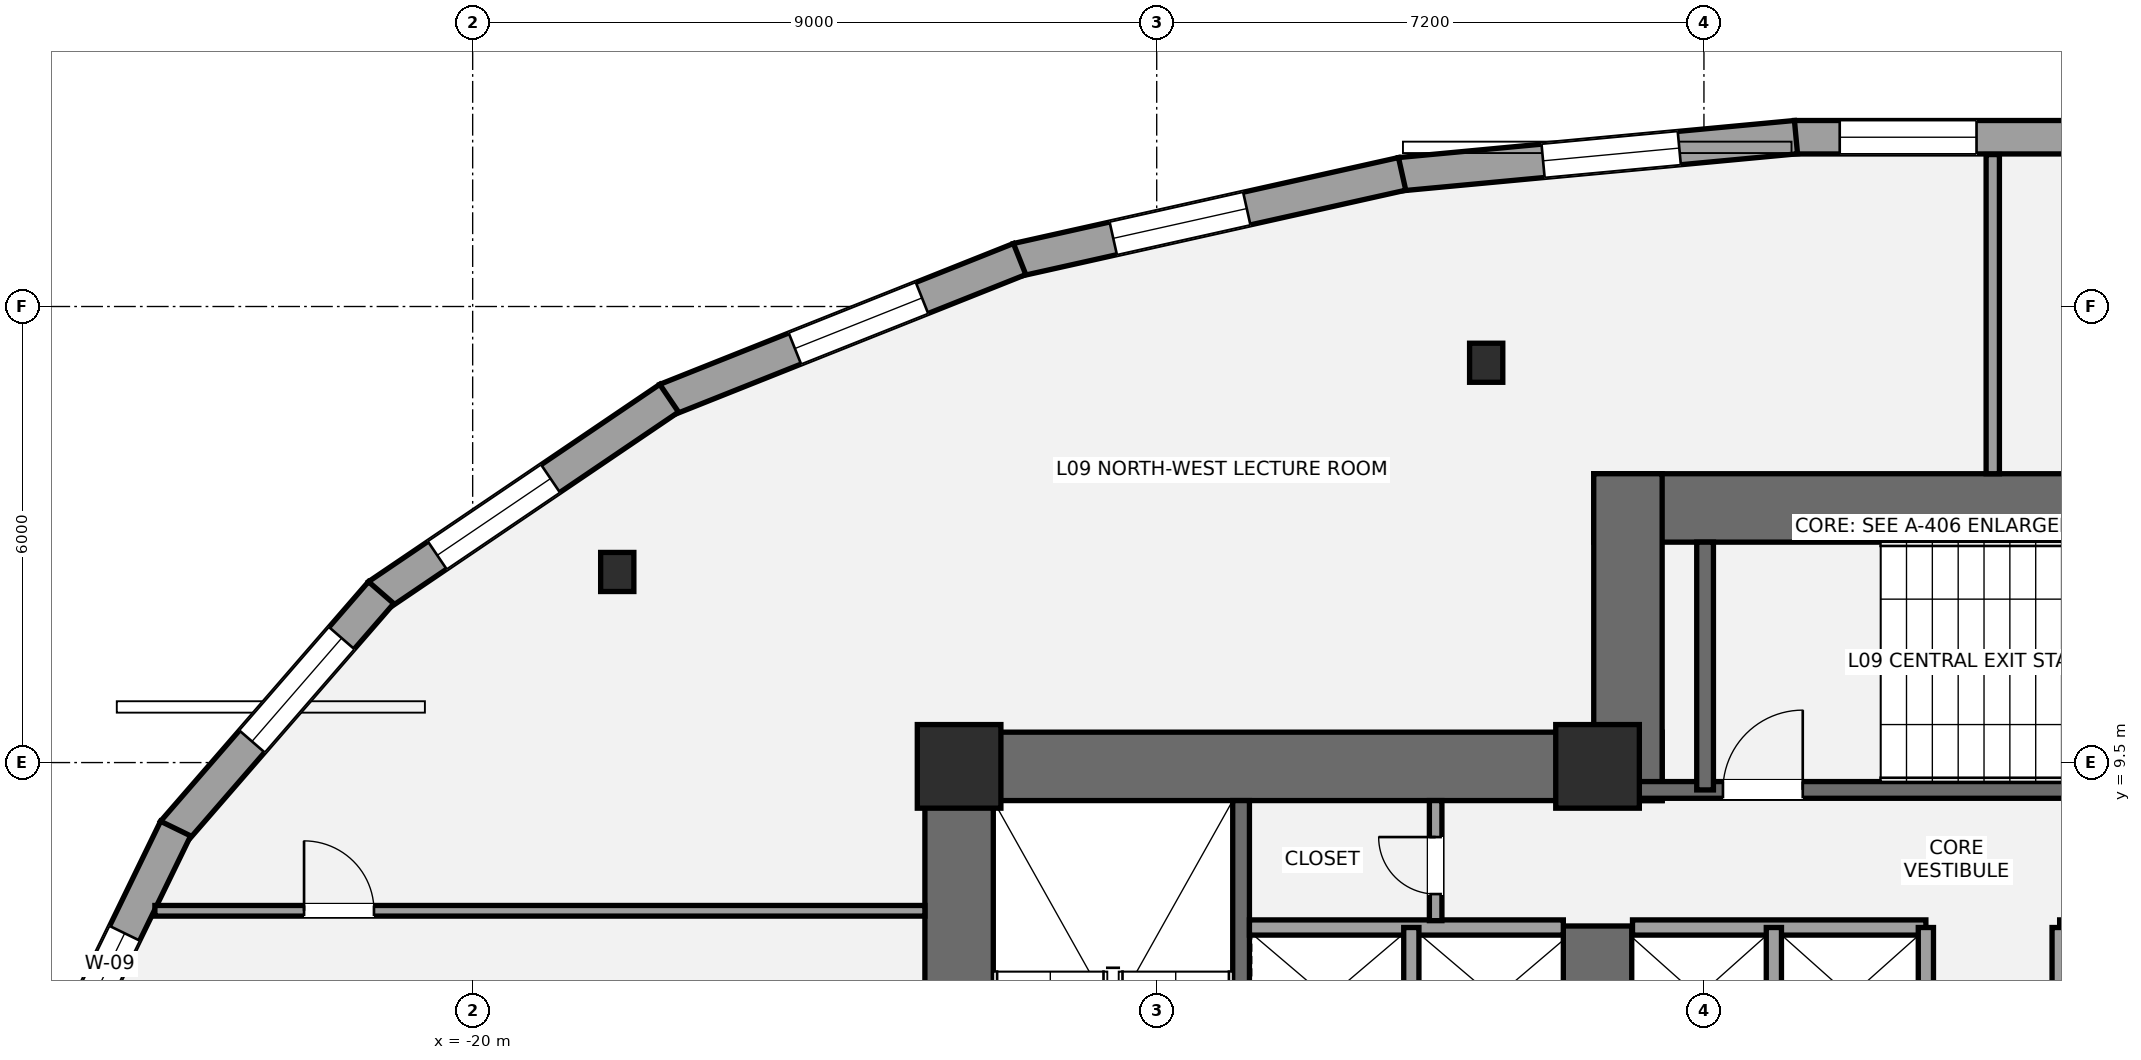
"""IFC4 building model, lengths in metres.
Left out: names, types, materials, properties, quantities, classifications, styles, units other than length and angle.
Written with IfcOpenShell. Run it as: python <this file> out.ifc"""

import sys

from ifc_helpers import new_model, si_unit, direction, frame, frame_2d, origin, origin_2d, place, context, subcontext, project, spatial, rectangle, i_section, extrude, element, fill, save


model = new_model("IFC4")
c1 = context("Model", 3, precision=1e-05, world=origin(), true_north=direction((0.0, 1.0)))
c2 = subcontext(c1, "Body", "Model", "MODEL_VIEW")
j1 = project(units=[si_unit("LENGTHUNIT", "METRE"), si_unit("PLANEANGLEUNIT", "RADIAN")], contexts=[c1])
p1 = place(None, origin())
s1 = spatial("IfcSite", under=j1, at=p1, CompositionType="ELEMENT")
p2 = place(p1, origin())
s2 = spatial("IfcBuilding", under=s1, at=p2, CompositionType="ELEMENT")
p3 = place(p2, frame((0.0, 0.0, 37.8)))
s3 = spatial("IfcBuildingStorey", under=s2, at=p3, CompositionType="ELEMENT", Elevation=37.8)
p4 = place(p3, frame((-13.6, 0.95, 0.0), z_axis=(0.0, 0.0, 1.0), x_axis=(0.0, 1.0, 0.0)))
e1 = element("IfcWall", 1, at=p4, inside=s3, PredefinedType="SHEAR", context=c2, shape_type="SweptSolid", body=[
    extrude(rectangle(XDim=8.95, YDim=0.9, at=frame_2d((4.475, 0.0))), origin(), (0.0, 0.0, 1.0), 3.6),
])
p5 = place(p3, frame((-14.05, 9.45, 0.0), z_axis=(0.0, 0.0, 1.0), x_axis=(1.0, 0.0, 0.0)))
e2 = element("IfcWall", 2, at=p5, inside=s3, PredefinedType="SHEAR", context=c2, shape_type="SweptSolid", body=[
    extrude(rectangle(XDim=9.7, YDim=0.9, at=frame_2d((4.85, 0.0))), origin(), (0.0, 0.0, 1.0), 3.6),
])
p6 = place(p3, frame((-5.2, 5.35, 0.0), z_axis=(0.0, 0.0, 1.0), x_axis=(0.0, 1.0, 0.0)))
e3 = element("IfcWall", 3, at=p6, inside=s3, PredefinedType="SHEAR", context=c2, shape_type="SweptSolid", body=[
    extrude(rectangle(XDim=2.0, YDim=0.9, at=frame_2d((1.0, 0.0))), origin(), (0.0, 0.0, 1.0), 3.6),
])
p7 = place(p3, frame((-9.89, 1.85, 0.0), z_axis=(0.0, 0.0, 1.0), x_axis=(0.0, 1.0, 0.0)))
e4 = element("IfcWall", 4, at=p7, inside=s3, PredefinedType="SHEAR", context=c2, shape_type="SweptSolid", body=[
    extrude(rectangle(XDim=7.15, YDim=0.22, at=frame_2d((3.575, 0.0))), origin(), (0.0, 0.0, 1.0), 3.6),
])
p8 = place(p3, frame((-5.25, 12.85, 0.0), z_axis=(0.0, 0.0, 1.0), x_axis=(1.0, 0.0, 0.0)))
e5 = element("IfcWall", 5, at=p8, inside=s3, PredefinedType="SHEAR", context=c2, shape_type="SweptSolid", body=[
    extrude(rectangle(XDim=10.5, YDim=0.9, at=frame_2d((5.25, 0.0))), origin(), (0.0, 0.0, 1.0), 3.6),
])
p9 = place(p3, frame((-4.8, 9.0, 0.0), z_axis=(0.0, 0.0, 1.0), x_axis=(0.0, 1.0, 0.0)))
e6 = element("IfcWall", 6, at=p9, inside=s3, PredefinedType="SHEAR", context=c2, shape_type="SweptSolid", body=[
    extrude(rectangle(XDim=4.3, YDim=0.9, at=frame_2d((2.15, 0.0))), origin(), (0.0, 0.0, 1.0), 3.6),
])
p10 = place(p3, frame((-4.7, 9.14, 0.0), z_axis=(0.0, 0.0, 1.0), x_axis=(1.0, 0.0, 0.0)))
e7 = element("IfcWall", 7, at=p10, inside=s3, PredefinedType="SHEAR", context=c2, shape_type="SweptSolid", body=[
    extrude(rectangle(XDim=9.3, YDim=0.22, at=frame_2d((4.65, 0.0))), origin(), (0.0, 0.0, 1.0), 3.6),
])
p11 = place(p10, frame((1.15, 0.0, 0.0)))
e8 = element("IfcOpeningElement", 8, at=p11, cuts=e7, PredefinedType="OPENING", context=c2, shape_type="SweptSolid", body=[
    extrude(rectangle(XDim=1.05, YDim=2.15, at=frame_2d((0.525, 1.075))), frame((0.0, 0.12, 0.0), z_axis=(0.0, -1.0, 0.0), x_axis=(1.0, 0.0, 0.0)), (0.0, 0.0, 1.0), 0.24),
])
p12 = place(p3, frame((-3.785, 9.14, 0.0), z_axis=(0.0, 0.0, 1.0), x_axis=(0.0, 1.0, 0.0)))
e9 = element("IfcWall", 9, at=p12, inside=s3, PredefinedType="SHEAR", context=c2, shape_type="SweptSolid", body=[
    extrude(rectangle(XDim=3.26, YDim=0.22, at=frame_2d((1.63, 0.0))), origin(), (0.0, 0.0, 1.0), 3.6),
])
for number, where, z_axis, x_axis in (
    (10, (-13.6, 9.45, 0.0), (0.0, 0.0, 1.0), (1.0, 0.0, 0.0)),
    (11, (-5.2, 9.45, 0.0), (0.0, 0.0, 1.0), (1.0, 0.0, 0.0)),
):
    element("IfcColumn", number, at=place(p3, frame(where, z_axis=z_axis, x_axis=x_axis)), inside=s3, PredefinedType="COLUMN", context=c2, shape_type="SweptSolid", body=[
        extrude(rectangle(XDim=1.1, YDim=1.1, at=origin_2d()), origin(), (0.0, 0.0, 1.0), 3.6),
    ])
for number, where, z_axis, x_axis in (
    (12, (-6.665, 14.76, 0.0), (0.0, 0.0, 1.0), (1.0, 0.0, 0.0)),
    (13, (-18.098, 12.007, 0.0), (0.0, 0.0, 1.0), (1.0, 0.0, 0.0)),
):
    element("IfcColumn", number, at=place(p3, frame(where, z_axis=z_axis, x_axis=x_axis)), inside=s3, PredefinedType="COLUMN", context=c2, shape_type="SweptSolid", body=[
        extrude(i_section(OverallWidth=0.437, OverallDepth=0.514, WebThickness=0.061, FlangeThickness=0.097, at=origin_2d()), origin(), (0.0, 0.0, 1.0), 3.6),
    ])
p13 = place(p3, frame((-2.61, 17.727, 0.0), z_axis=(0.0, 0.0, 1.0), x_axis=(1.0, 0.0, 0.0)))
e14 = element("IfcWall", 14, at=p13, inside=s3, PredefinedType="STANDARD", context=c2, shape_type="SweptSolid", body=[
    extrude(rectangle(XDim=5.219, YDim=0.44, at=frame_2d((2.61, 0.0))), origin(), (0.0, 0.0, 1.0), 2.533),
])
p14 = place(p13, frame((0.596, 0.0, 0.65)))
e15 = element("IfcOpeningElement", 15, at=p14, cuts=e14, PredefinedType="OPENING", context=c2, shape_type="SweptSolid", body=[
    extrude(rectangle(XDim=1.8, YDim=1.7, at=frame_2d((0.9, 0.85))), frame((0.0, 0.23, 0.0), z_axis=(0.0, -1.0, 0.0), x_axis=(1.0, 0.0, 0.0)), (0.0, 0.0, 1.0), 0.46),
])
p15 = place(p3, frame((-7.799, 17.24, 0.0), z_axis=(0.0, 0.0, 1.0), x_axis=(0.995649119539, 0.093181708301, 0.0)))
e16 = element("IfcWall", 16, at=p15, inside=s3, PredefinedType="STANDARD", context=c2, shape_type="SweptSolid", body=[
    extrude(rectangle(XDim=5.232, YDim=0.44, at=frame_2d((2.616, 0.0))), origin(), (0.0, 0.0, 1.0), 2.533),
])
p16 = place(p15, frame((1.89, 0.0, 0.65)))
e17 = element("IfcOpeningElement", 17, at=p16, cuts=e16, PredefinedType="OPENING", context=c2, shape_type="SweptSolid", body=[
    extrude(rectangle(XDim=1.8, YDim=1.7, at=frame_2d((0.9, 0.85))), frame((0.0, 0.23, 0.0), z_axis=(0.0, -1.0, 0.0), x_axis=(1.0, 0.0, 0.0)), (0.0, 0.0, 1.0), 0.46),
])
p17 = place(p3, frame((-12.837, 16.114, 0.0), z_axis=(0.0, 0.0, 1.0), x_axis=(0.975980782399, 0.217856632648, 0.0)))
e18 = element("IfcWall", 18, at=p17, inside=s3, PredefinedType="STANDARD", context=c2, shape_type="SweptSolid", body=[
    extrude(rectangle(XDim=5.191, YDim=0.44, at=frame_2d((2.595, 0.0))), origin(), (0.0, 0.0, 1.0), 2.533),
])
p18 = place(p17, frame((1.297, 0.0, 0.65)))
e19 = element("IfcOpeningElement", 19, at=p18, cuts=e18, PredefinedType="OPENING", context=c2, shape_type="SweptSolid", body=[
    extrude(rectangle(XDim=1.8, YDim=1.7, at=frame_2d((0.9, 0.85))), frame((0.0, 0.23, 0.0), z_axis=(0.0, -1.0, 0.0), x_axis=(1.0, 0.0, 0.0)), (0.0, 0.0, 1.0), 0.46),
])
p19 = place(p3, frame((-17.457, 14.271, 0.0), z_axis=(0.0, 0.0, 1.0), x_axis=(0.929030310441, 0.370003624688, 0.0)))
e20 = element("IfcWall", 20, at=p19, inside=s3, PredefinedType="STANDARD", context=c2, shape_type="SweptSolid", body=[
    extrude(rectangle(XDim=5.009, YDim=0.44, at=frame_2d((2.504, 0.0))), origin(), (0.0, 0.0, 1.0), 2.533),
])
p20 = place(p19, frame((1.826, 0.0, 0.65)))
e21 = element("IfcOpeningElement", 21, at=p20, cuts=e20, PredefinedType="OPENING", context=c2, shape_type="SweptSolid", body=[
    extrude(rectangle(XDim=1.8, YDim=1.7, at=frame_2d((0.9, 0.85))), frame((0.0, 0.23, 0.0), z_axis=(0.0, -1.0, 0.0), x_axis=(1.0, 0.0, 0.0)), (0.0, 0.0, 1.0), 0.46),
])
p21 = place(p3, frame((-21.247, 11.698, 0.0), z_axis=(0.0, 0.0, 1.0), x_axis=(0.827913159939, 0.560856309227, 0.0)))
e22 = element("IfcWall", 22, at=p21, inside=s3, PredefinedType="STANDARD", context=c2, shape_type="SweptSolid", body=[
    extrude(rectangle(XDim=4.629, YDim=0.44, at=frame_2d((2.314, 0.0))), origin(), (0.0, 0.0, 1.0), 2.533),
])
p22 = place(p21, frame((0.943, 0.0, 0.65)))
e23 = element("IfcOpeningElement", 23, at=p22, cuts=e22, PredefinedType="OPENING", context=c2, shape_type="SweptSolid", body=[
    extrude(rectangle(XDim=1.8, YDim=1.7, at=frame_2d((0.9, 0.85))), frame((0.0, 0.23, 0.0), z_axis=(0.0, -1.0, 0.0), x_axis=(1.0, 0.0, 0.0)), (0.0, 0.0, 1.0), 0.46),
])
p23 = place(p3, frame((-23.94, 8.584, 0.0), z_axis=(0.0, 0.0, 1.0), x_axis=(0.655509370307, 0.755187040037, 0.0)))
e24 = element("IfcWall", 24, at=p23, inside=s3, PredefinedType="STANDARD", context=c2, shape_type="SweptSolid", body=[
    extrude(rectangle(XDim=4.174, YDim=0.44, at=frame_2d((2.087, 0.0))), origin(), (0.0, 0.0, 1.0), 2.533),
])
p24 = place(p23, frame((1.582, 0.0, 0.65)))
e25 = element("IfcOpeningElement", 25, at=p24, cuts=e24, PredefinedType="OPENING", context=c2, shape_type="SweptSolid", body=[
    extrude(rectangle(XDim=1.8, YDim=1.7, at=frame_2d((0.9, 0.85))), frame((0.0, 0.23, 0.0), z_axis=(0.0, -1.0, 0.0), x_axis=(1.0, 0.0, 0.0)), (0.0, 0.0, 1.0), 0.46),
])
p25 = place(p3, frame((-25.578, 5.2, 0.0), z_axis=(0.0, 0.0, 1.0), x_axis=(0.437488090563, 0.899224204865, 0.0)))
e26 = element("IfcWall", 26, at=p25, inside=s3, PredefinedType="STANDARD", context=c2, shape_type="SweptSolid", body=[
    extrude(rectangle(XDim=3.816, YDim=0.44, at=frame_2d((1.908, 0.0))), origin(), (0.0, 0.0, 1.0), 2.533),
])
p26 = place(p25, frame((1.384, 0.0, 0.58)))
e27 = element("IfcOpeningElement", 27, at=p26, cuts=e26, PredefinedType="OPENING", context=c2, shape_type="SweptSolid", body=[
    extrude(rectangle(XDim=0.9, YDim=1.35, at=frame_2d((0.45, 0.675))), frame((0.0, 0.23, 0.0), z_axis=(0.0, -1.0, 0.0), x_axis=(1.0, 0.0, 0.0)), (0.0, 0.0, 1.0), 0.46),
])
p27 = place(p3, frame((-9.78, 7.33, 0.0), z_axis=(0.0, 0.0, 1.0), x_axis=(1.0, 0.0, 0.0)))
e28 = element("IfcWall", 28, at=p27, inside=s3, PredefinedType="SOLIDWALL", context=c2, shape_type="SweptSolid", body=[
    extrude(rectangle(XDim=4.13, YDim=0.2, at=frame_2d((2.065, 0.0))), origin(), (0.0, 0.0, 1.0), 3.4),
])
p28 = place(p3, frame((-7.65, 5.47, 0.0), z_axis=(0.0, 0.0, 1.0), x_axis=(0.0, 1.0, 0.0)))
e29 = element("IfcWall", 29, at=p28, inside=s3, PredefinedType="SOLIDWALL", context=c2, shape_type="SweptSolid", body=[
    extrude(rectangle(XDim=1.86, YDim=0.2, at=frame_2d((0.93, 0.0))), origin(), (0.0, 0.0, 1.0), 3.4),
])
for number, where, z_axis, x_axis in (
    (30, (-4.74, 7.33, 0.0), (0.0, 0.0, 1.0), (1.0, 0.0, 0.0)),
    (31, (0.88, 7.33, 0.0), (0.0, 0.0, 1.0), (1.0, 0.0, 0.0)),
):
    element("IfcWall", number, at=place(p3, frame(where, z_axis=z_axis, x_axis=x_axis)), inside=s3, PredefinedType="SOLIDWALL", context=c2, shape_type="SweptSolid", body=[
        extrude(rectangle(XDim=3.86, YDim=0.2, at=frame_2d((1.93, 0.0))), origin(), (0.0, 0.0, 1.0), 3.4),
    ])
for number, where, z_axis, x_axis in (
    (32, (-2.88, 5.52, 0.0), (0.0, 0.0, 1.0), (0.0, 1.0, 0.0)),
    (33, (-0.88, 5.52, 0.0), (0.0, 0.0, 1.0), (0.0, 1.0, 0.0)),
    (34, (0.88, 5.52, 0.0), (0.0, 0.0, 1.0), (0.0, 1.0, 0.0)),
):
    element("IfcWall", number, at=place(p3, frame(where, z_axis=z_axis, x_axis=x_axis)), inside=s3, PredefinedType="SOLIDWALL", context=c2, shape_type="SweptSolid", body=[
        extrude(rectangle(XDim=1.81, YDim=0.2, at=frame_2d((0.905, 0.0))), origin(), (0.0, 0.0, 1.0), 3.4),
    ])
p29 = place(p3, frame((-7.33, 7.42, 0.0), z_axis=(0.0, 0.0, 1.0), x_axis=(0.0, 1.0, 0.0)))
e35 = element("IfcWall", 35, at=p29, inside=s3, PredefinedType="PARTITIONING", context=c2, shape_type="SweptSolid", body=[
    extrude(rectangle(XDim=1.58, YDim=0.165, at=frame_2d((0.79, 0.0))), origin(), (0.0, 0.0, 1.0), 3.4),
])
p30 = place(p29, frame((0.35, 0.0, 0.0)))
e36 = element("IfcOpeningElement", 36, at=p30, cuts=e35, PredefinedType="OPENING", context=c2, shape_type="SweptSolid", body=[
    extrude(rectangle(XDim=0.75, YDim=2.1, at=frame_2d((0.375, 1.05))), frame((0.0, 0.093, 0.0), z_axis=(0.0, -1.0, 0.0), x_axis=(1.0, 0.0, 0.0)), (0.0, 0.0, 1.0), 0.185),
])
p31 = place(p3, frame((-24.181, 7.55, 0.0), z_axis=(0.0, 0.0, 1.0), x_axis=(1.0, 0.0, 0.0)))
e37 = element("IfcWall", 37, at=p31, inside=s3, PredefinedType="PARTITIONING", context=c2, shape_type="SweptSolid", body=[
    extrude(rectangle(XDim=10.131, YDim=0.14, at=frame_2d((5.065, 0.0))), origin(), (0.0, 0.0, 1.0), 2.853),
])
p32 = place(p31, frame((1.963, 0.0, 0.0)))
e38 = element("IfcOpeningElement", 38, at=p32, cuts=e37, PredefinedType="OPENING", context=c2, shape_type="SweptSolid", body=[
    extrude(rectangle(XDim=0.92, YDim=2.15, at=frame_2d((0.46, 1.075))), frame((0.0, 0.08, 0.0), z_axis=(0.0, -1.0, 0.0), x_axis=(1.0, 0.0, 0.0)), (0.0, 0.0, 1.0), 0.16),
])
p33 = place(p3, frame((0.0, 13.3, 0.0), z_axis=(0.0, 0.0, 1.0), x_axis=(0.0, 1.0, 0.0)))
e39 = element("IfcWall", 39, at=p33, inside=s3, PredefinedType="PARTITIONING", context=c2, shape_type="SweptSolid", body=[
    extrude(rectangle(XDim=4.199, YDim=0.175, at=frame_2d((2.1, 0.0))), origin(), (0.0, 0.0, 1.0), 3.4),
])
p34 = place(p14, origin())
e40 = element("IfcWindow", 40, at=p34, inside=s3, PartitioningType="SINGLE_PANEL", PredefinedType="WINDOW", context=c2, shape_type="SweptSolid", body=[
    extrude(rectangle(XDim=1.8, YDim=1.7, at=frame_2d((0.9, 0.85))), frame((0.0, -0.01, 0.0), z_axis=(0.0, -1.0, 0.0), x_axis=(1.0, 0.0, 0.0)), (0.0, 0.0, 1.0), 0.06),
])
fill(e15, e40)
p35 = place(p16, origin())
e41 = element("IfcWindow", 41, at=p35, inside=s3, PartitioningType="SINGLE_PANEL", PredefinedType="WINDOW", context=c2, shape_type="SweptSolid", body=[
    extrude(rectangle(XDim=1.8, YDim=1.7, at=frame_2d((0.9, 0.85))), frame((0.0, -0.01, 0.0), z_axis=(0.0, -1.0, 0.0), x_axis=(1.0, 0.0, 0.0)), (0.0, 0.0, 1.0), 0.06),
])
fill(e17, e41)
p36 = place(p18, origin())
e42 = element("IfcWindow", 42, at=p36, inside=s3, PartitioningType="SINGLE_PANEL", PredefinedType="WINDOW", context=c2, shape_type="SweptSolid", body=[
    extrude(rectangle(XDim=1.8, YDim=1.7, at=frame_2d((0.9, 0.85))), frame((0.0, -0.01, 0.0), z_axis=(0.0, -1.0, 0.0), x_axis=(1.0, 0.0, 0.0)), (0.0, 0.0, 1.0), 0.06),
])
fill(e19, e42)
p37 = place(p20, origin())
e43 = element("IfcWindow", 43, at=p37, inside=s3, PartitioningType="SINGLE_PANEL", PredefinedType="WINDOW", context=c2, shape_type="SweptSolid", body=[
    extrude(rectangle(XDim=1.8, YDim=1.7, at=frame_2d((0.9, 0.85))), frame((0.0, -0.01, 0.0), z_axis=(0.0, -1.0, 0.0), x_axis=(1.0, 0.0, 0.0)), (0.0, 0.0, 1.0), 0.06),
])
fill(e21, e43)
p38 = place(p22, origin())
e44 = element("IfcWindow", 44, at=p38, inside=s3, PartitioningType="SINGLE_PANEL", PredefinedType="WINDOW", context=c2, shape_type="SweptSolid", body=[
    extrude(rectangle(XDim=1.8, YDim=1.7, at=frame_2d((0.9, 0.85))), frame((0.0, -0.01, 0.0), z_axis=(0.0, -1.0, 0.0), x_axis=(1.0, 0.0, 0.0)), (0.0, 0.0, 1.0), 0.06),
])
fill(e23, e44)
p39 = place(p24, origin())
e45 = element("IfcWindow", 45, at=p39, inside=s3, PartitioningType="SINGLE_PANEL", PredefinedType="WINDOW", context=c2, shape_type="SweptSolid", body=[
    extrude(rectangle(XDim=1.8, YDim=1.7, at=frame_2d((0.9, 0.85))), frame((0.0, -0.01, 0.0), z_axis=(0.0, -1.0, 0.0), x_axis=(1.0, 0.0, 0.0)), (0.0, 0.0, 1.0), 0.06),
])
fill(e25, e45)
p40 = place(p26, origin())
e46 = element("IfcWindow", 46, at=p40, inside=s3, PartitioningType="SINGLE_PANEL", PredefinedType="WINDOW", context=c2, shape_type="SweptSolid", body=[
    extrude(rectangle(XDim=0.9, YDim=1.35, at=frame_2d((0.45, 0.675))), frame((0.0, -0.01, 0.0), z_axis=(0.0, -1.0, 0.0), x_axis=(1.0, 0.0, 0.0)), (0.0, 0.0, 1.0), 0.06),
])
fill(e27, e46)
p41 = place(p11, origin())
e47 = element("IfcDoor", 47, at=p41, inside=s3, OperationType="SINGLE_SWING_RIGHT", PredefinedType="DOOR", context=c2, shape_type="SweptSolid", body=[
    extrude(rectangle(XDim=1.05, YDim=2.15, at=frame_2d((0.525, 1.075))), frame((0.0, 0.025, 0.0), z_axis=(0.0, -1.0, 0.0), x_axis=(1.0, 0.0, 0.0)), (0.0, 0.0, 1.0), 0.05),
])
fill(e8, e47)
p42 = place(p30, origin())
e48 = element("IfcDoor", 48, at=p42, inside=s3, OperationType="SINGLE_SWING_RIGHT", PredefinedType="DOOR", context=c2, shape_type="SweptSolid", body=[
    extrude(rectangle(XDim=0.75, YDim=2.1, at=frame_2d((0.375, 1.05))), frame((0.0, 0.025, 0.0), z_axis=(0.0, -1.0, 0.0), x_axis=(1.0, 0.0, 0.0)), (0.0, 0.0, 1.0), 0.05),
])
fill(e36, e48)
p43 = place(p32, origin())
e49 = element("IfcDoor", 49, at=p43, inside=s3, OperationType="SINGLE_SWING_LEFT", PredefinedType="DOOR", context=c2, shape_type="SweptSolid", body=[
    extrude(rectangle(XDim=0.92, YDim=2.15, at=frame_2d((0.46, 1.075))), frame((0.0, 0.025, 0.0), z_axis=(0.0, -1.0, 0.0), x_axis=(1.0, 0.0, 0.0)), (0.0, 0.0, 1.0), 0.05),
])
fill(e38, e49)
save(model, sys.argv[1])
